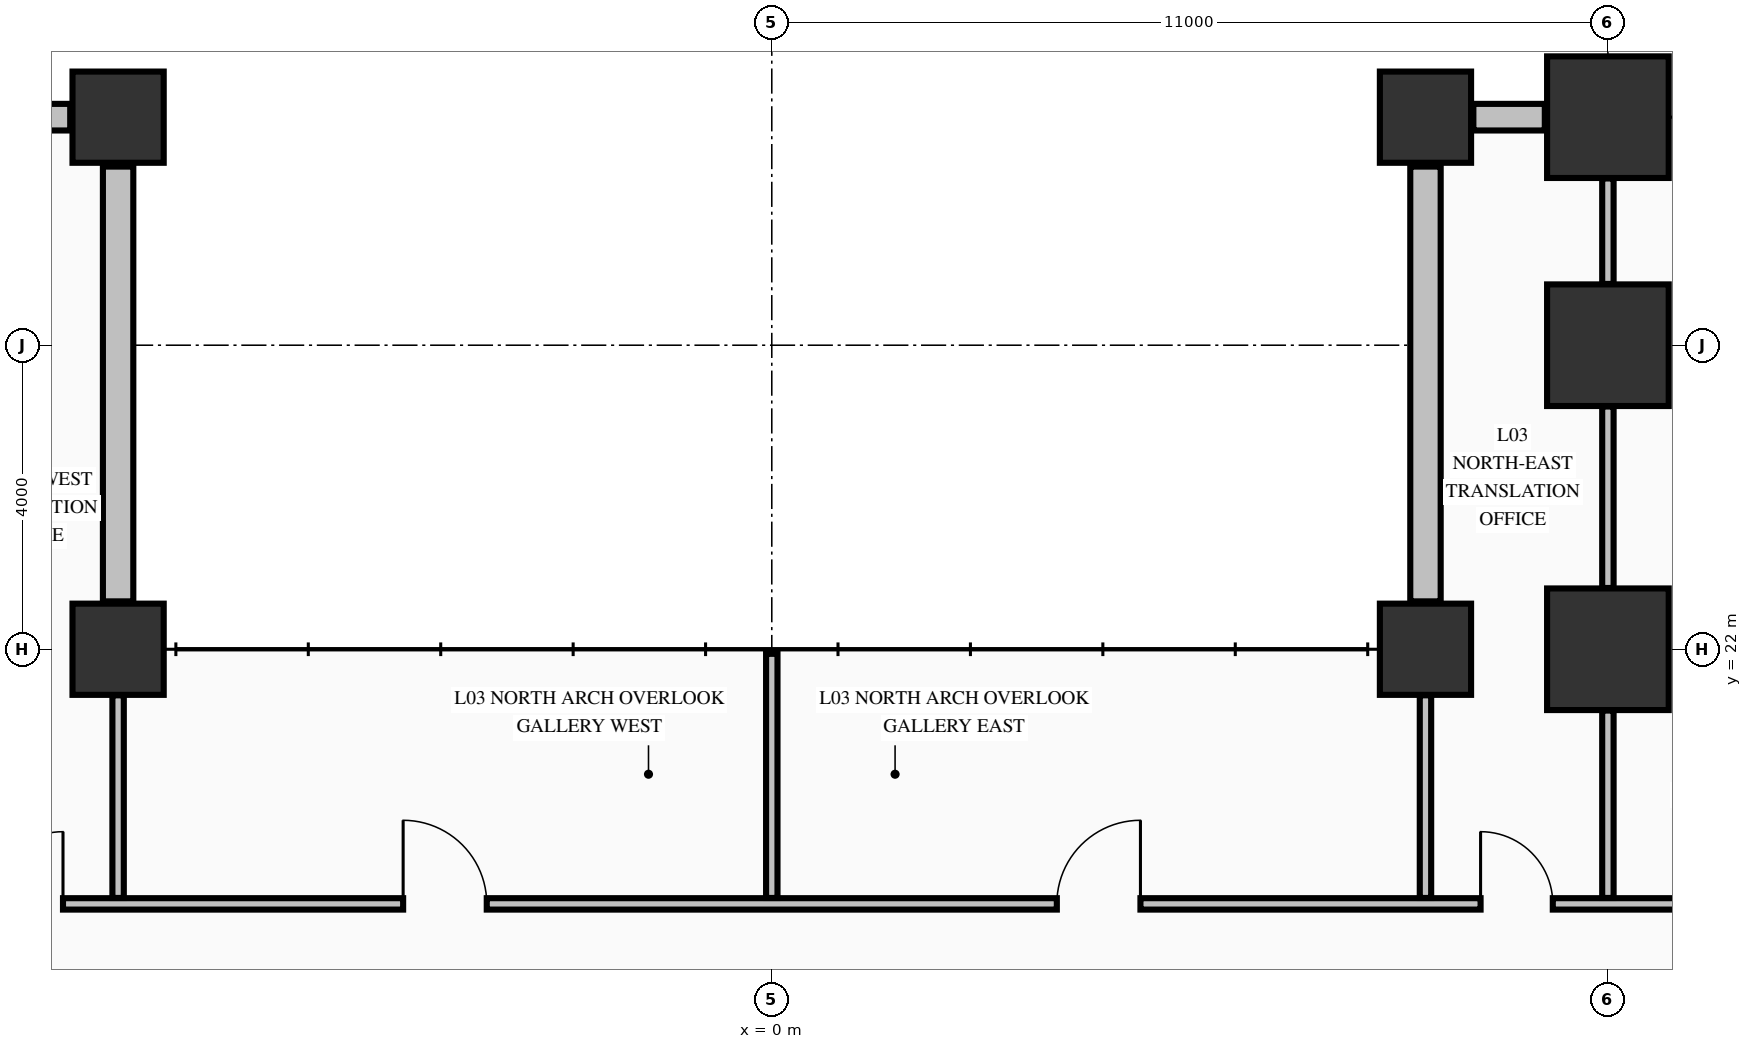
"""IFC4 building model, lengths in metres.
Left out: names, types, materials, properties, quantities, classifications, styles, units other than length and angle.
Written with IfcOpenShell. Run it as: python <this file> out.ifc"""

import sys

from ifc_helpers import new_model, si_unit, direction, frame, frame_2d, origin, origin_2d, place, context, subcontext, project, spatial, rectangle, extrude, element, fill, save


model = new_model("IFC4")
c1 = context("Model", 3, precision=1e-05, world=origin(), true_north=direction((0.0, 1.0)))
c2 = subcontext(c1, "Body", "Model", "MODEL_VIEW")
j1 = project(units=[si_unit("LENGTHUNIT", "METRE"), si_unit("PLANEANGLEUNIT", "RADIAN")], contexts=[c1])
p1 = place(None, origin())
s1 = spatial("IfcSite", under=j1, at=p1, CompositionType="ELEMENT")
p2 = place(p1, origin())
s2 = spatial("IfcBuilding", under=s1, at=p2, CompositionType="ELEMENT")
p3 = place(p2, frame((0.0, 0.0, 16.32)))
s3 = spatial("IfcBuildingStorey", under=s2, at=p3, CompositionType="ELEMENT", Elevation=16.32)
for number, where, z_axis, x_axis in (
    (1, (11.0, 22.0, 0.0), (0.0, 0.0, 1.0), (1.0, 0.0, 0.0)),
    (2, (11.0, 26.0, 0.0), (0.0, 0.0, 1.0), (1.0, 0.0, 0.0)),
    (3, (11.0, 29.0, 0.0), (0.0, 0.0, 1.0), (1.0, 0.0, 0.0)),
):
    element("IfcColumn", number, at=place(p3, frame(where, z_axis=z_axis, x_axis=x_axis)), inside=s3, PredefinedType="COLUMN", context=c2, shape_type="SweptSolid", body=[
        extrude(rectangle(XDim=1.6, YDim=1.6, at=origin_2d()), origin(), (0.0, 0.0, 1.0), 4.99),
    ])
for number, where, z_axis, x_axis in (
    (4, (-8.6, 22.0, 0.0), (0.0, 0.0, 1.0), (1.0, 0.0, 0.0)),
    (5, (8.6, 22.0, 0.0), (0.0, 0.0, 1.0), (1.0, 0.0, 0.0)),
    (6, (-8.6, 29.0, 0.0), (0.0, 0.0, 1.0), (1.0, 0.0, 0.0)),
    (7, (8.6, 29.0, 0.0), (0.0, 0.0, 1.0), (1.0, 0.0, 0.0)),
):
    element("IfcColumn", number, at=place(p3, frame(where, z_axis=z_axis, x_axis=x_axis)), inside=s3, PredefinedType="COLUMN", context=c2, shape_type="SweptSolid", body=[
        extrude(rectangle(XDim=1.2, YDim=1.2, at=origin_2d()), origin(), (0.0, 0.0, 1.0), 4.99),
    ])
for number, where, z_axis, x_axis in (
    (8, (-9.23, 29.0, 0.0), (0.0, 0.0, 1.0), (-1.0, 0.0, 0.0)),
    (9, (10.17, 29.0, 0.0), (0.0, 0.0, 1.0), (-1.0, 0.0, 0.0)),
):
    element("IfcWall", number, at=place(p3, frame(where, z_axis=z_axis, x_axis=x_axis)), inside=s3, PredefinedType="STANDARD", context=c2, shape_type="SweptSolid", body=[
        extrude(rectangle(XDim=0.94, YDim=0.35, at=frame_2d((0.47, 0.0))), origin(), (0.0, 0.0, 1.0), 3.332),
    ])
for number, where, z_axis, x_axis in (
    (10, (-8.6, 22.63, 0.0), (0.0, 0.0, 1.0), (0.0, 1.0, 0.0)),
    (11, (8.6, 28.35, 0.0), (0.0, 0.0, 1.0), (0.0, -1.0, 0.0)),
):
    element("IfcWall", number, at=place(p3, frame(where, z_axis=z_axis, x_axis=x_axis)), inside=s3, PredefinedType="STANDARD", context=c2, shape_type="SweptSolid", body=[
        extrude(rectangle(XDim=5.72, YDim=0.4, at=frame_2d((2.86, 0.0))), origin(), (0.0, 0.0, 1.0), 3.332),
    ])
p4 = place(p3, frame((-33.835, 18.65, 0.0), z_axis=(0.0, 0.0, 1.0), x_axis=(1.0, 0.0, 0.0)))
e12 = element("IfcWall", 12, at=p4, inside=s3, PredefinedType="PARTITIONING", context=c2, shape_type="SweptSolid", body=[
    extrude(rectangle(XDim=63.685, YDim=0.15, at=frame_2d((31.843, 0.0))), origin(), (0.0, 0.0, 1.0), 4.99),
])
p5 = place(p4, frame((1.285, 0.0, 0.0)))
e13 = element("IfcOpeningElement", 13, at=p5, cuts=e12, PredefinedType="OPENING", context=c2, shape_type="SweptSolid", body=[
    extrude(rectangle(XDim=1.1, YDim=2.15, at=frame_2d((0.55, 1.075))), frame((0.0, 0.085, 0.0), z_axis=(0.0, -1.0, 0.0), x_axis=(1.0, 0.0, 0.0)), (0.0, 0.0, 1.0), 0.17),
])
p6 = place(p4, frame((5.285, 0.0, 0.0)))
e14 = element("IfcOpeningElement", 14, at=p6, cuts=e12, PredefinedType="OPENING", context=c2, shape_type="SweptSolid", body=[
    extrude(rectangle(XDim=1.1, YDim=2.15, at=frame_2d((0.55, 1.075))), frame((0.0, 0.085, 0.0), z_axis=(0.0, -1.0, 0.0), x_axis=(1.0, 0.0, 0.0)), (0.0, 0.0, 1.0), 0.17),
])
p7 = place(p4, frame((8.785, 0.0, 0.0)))
e15 = element("IfcOpeningElement", 15, at=p7, cuts=e12, PredefinedType="OPENING", context=c2, shape_type="SweptSolid", body=[
    extrude(rectangle(XDim=1.1, YDim=2.15, at=frame_2d((0.55, 1.075))), frame((0.0, 0.085, 0.0), z_axis=(0.0, -1.0, 0.0), x_axis=(1.0, 0.0, 0.0)), (0.0, 0.0, 1.0), 0.17),
])
p8 = place(p4, frame((11.785, 0.0, 0.0)))
e16 = element("IfcOpeningElement", 16, at=p8, cuts=e12, PredefinedType="OPENING", context=c2, shape_type="SweptSolid", body=[
    extrude(rectangle(XDim=1.1, YDim=2.15, at=frame_2d((0.55, 1.075))), frame((0.0, 0.085, 0.0), z_axis=(0.0, -1.0, 0.0), x_axis=(1.0, 0.0, 0.0)), (0.0, 0.0, 1.0), 0.17),
])
p9 = place(p4, frame((15.535, 0.0, 0.0)))
e17 = element("IfcOpeningElement", 17, at=p9, cuts=e12, PredefinedType="OPENING", context=c2, shape_type="SweptSolid", body=[
    extrude(rectangle(XDim=1.1, YDim=2.15, at=frame_2d((0.55, 1.075))), frame((0.0, 0.085, 0.0), z_axis=(0.0, -1.0, 0.0), x_axis=(1.0, 0.0, 0.0)), (0.0, 0.0, 1.0), 0.17),
])
p10 = place(p4, frame((20.035, 0.0, 0.0)))
e18 = element("IfcOpeningElement", 18, at=p10, cuts=e12, PredefinedType="OPENING", context=c2, shape_type="SweptSolid", body=[
    extrude(rectangle(XDim=1.1, YDim=2.15, at=frame_2d((0.55, 1.075))), frame((0.0, 0.085, 0.0), z_axis=(0.0, -1.0, 0.0), x_axis=(1.0, 0.0, 0.0)), (0.0, 0.0, 1.0), 0.17),
])
p11 = place(p4, frame((23.56, 0.0, 0.0)))
e19 = element("IfcOpeningElement", 19, at=p11, cuts=e12, PredefinedType="OPENING", context=c2, shape_type="SweptSolid", body=[
    extrude(rectangle(XDim=0.95, YDim=2.15, at=frame_2d((0.475, 1.075))), frame((0.0, 0.085, 0.0), z_axis=(0.0, -1.0, 0.0), x_axis=(1.0, 0.0, 0.0)), (0.0, 0.0, 1.0), 0.17),
])
p12 = place(p4, frame((28.985, 0.0, 0.0)))
e20 = element("IfcOpeningElement", 20, at=p12, cuts=e12, PredefinedType="OPENING", context=c2, shape_type="SweptSolid", body=[
    extrude(rectangle(XDim=1.1, YDim=2.15, at=frame_2d((0.55, 1.075))), frame((0.0, 0.085, 0.0), z_axis=(0.0, -1.0, 0.0), x_axis=(1.0, 0.0, 0.0)), (0.0, 0.0, 1.0), 0.17),
])
p13 = place(p4, frame((37.585, 0.0, 0.0)))
e21 = element("IfcOpeningElement", 21, at=p13, cuts=e12, PredefinedType="OPENING", context=c2, shape_type="SweptSolid", body=[
    extrude(rectangle(XDim=1.1, YDim=2.15, at=frame_2d((0.55, 1.075))), frame((0.0, 0.085, 0.0), z_axis=(0.0, -1.0, 0.0), x_axis=(1.0, 0.0, 0.0)), (0.0, 0.0, 1.0), 0.17),
])
p14 = place(p4, frame((43.16, 0.0, 0.0)))
e22 = element("IfcOpeningElement", 22, at=p14, cuts=e12, PredefinedType="OPENING", context=c2, shape_type="SweptSolid", body=[
    extrude(rectangle(XDim=0.95, YDim=2.15, at=frame_2d((0.475, 1.075))), frame((0.0, 0.085, 0.0), z_axis=(0.0, -1.0, 0.0), x_axis=(1.0, 0.0, 0.0)), (0.0, 0.0, 1.0), 0.17),
])
p15 = place(p4, frame((61.31, 0.0, 0.0)))
e23 = element("IfcOpeningElement", 23, at=p15, cuts=e12, PredefinedType="OPENING", context=c2, shape_type="SweptSolid", body=[
    extrude(rectangle(XDim=0.95, YDim=2.15, at=frame_2d((0.475, 1.075))), frame((0.0, 0.085, 0.0), z_axis=(0.0, -1.0, 0.0), x_axis=(1.0, 0.0, 0.0)), (0.0, 0.0, 1.0), 0.17),
])
p16 = place(p4, frame((47.56, 0.0, 0.0)))
e24 = element("IfcOpeningElement", 24, at=p16, cuts=e12, PredefinedType="OPENING", context=c2, shape_type="SweptSolid", body=[
    extrude(rectangle(XDim=0.95, YDim=2.15, at=frame_2d((0.475, 1.075))), frame((0.0, 0.085, 0.0), z_axis=(0.0, -1.0, 0.0), x_axis=(1.0, 0.0, 0.0)), (0.0, 0.0, 1.0), 0.17),
])
p17 = place(p4, frame((51.31, 0.0, 0.0)))
e25 = element("IfcOpeningElement", 25, at=p17, cuts=e12, PredefinedType="OPENING", context=c2, shape_type="SweptSolid", body=[
    extrude(rectangle(XDim=1.05, YDim=2.15, at=frame_2d((0.525, 1.075))), frame((0.0, 0.085, 0.0), z_axis=(0.0, -1.0, 0.0), x_axis=(1.0, 0.0, 0.0)), (0.0, 0.0, 1.0), 0.17),
])
p18 = place(p4, frame((56.06, 0.0, 0.0)))
e26 = element("IfcOpeningElement", 26, at=p18, cuts=e12, PredefinedType="OPENING", context=c2, shape_type="SweptSolid", body=[
    extrude(rectangle(XDim=0.95, YDim=2.15, at=frame_2d((0.475, 1.075))), frame((0.0, 0.085, 0.0), z_axis=(0.0, -1.0, 0.0), x_axis=(1.0, 0.0, 0.0)), (0.0, 0.0, 1.0), 0.17),
])
p19 = place(p4, frame((58.535, 0.0, 0.0)))
e27 = element("IfcOpeningElement", 27, at=p19, cuts=e12, PredefinedType="OPENING", context=c2, shape_type="SweptSolid", body=[
    extrude(rectangle(XDim=0.9, YDim=2.15, at=frame_2d((0.45, 1.075))), frame((0.0, 0.085, 0.0), z_axis=(0.0, -1.0, 0.0), x_axis=(1.0, 0.0, 0.0)), (0.0, 0.0, 1.0), 0.17),
])
p20 = place(p3, frame((-8.6, 18.728, 0.0), z_axis=(0.0, 0.0, 1.0), x_axis=(0.0, 1.0, 0.0)))
e28 = element("IfcWall", 28, at=p20, inside=s3, PredefinedType="PARTITIONING", context=c2, shape_type="SweptSolid", body=[
    extrude(rectangle(XDim=2.666, YDim=0.15, at=frame_2d((1.333, 0.0))), origin(), (0.0, 0.0, 1.0), 3.332),
])
p21 = place(p3, frame((0.0, 18.728, 0.0), z_axis=(0.0, 0.0, 1.0), x_axis=(0.0, 1.0, 0.0)))
e29 = element("IfcWall", 29, at=p21, inside=s3, PredefinedType="PARTITIONING", context=c2, shape_type="SweptSolid", body=[
    extrude(rectangle(XDim=3.212, YDim=0.15, at=frame_2d((1.606, 0.0))), origin(), (0.0, 0.0, 1.0), 3.332),
])
p22 = place(p3, frame((8.6, 18.728, 0.0), z_axis=(0.0, 0.0, 1.0), x_axis=(0.0, 1.0, 0.0)))
e30 = element("IfcWall", 30, at=p22, inside=s3, PredefinedType="PARTITIONING", context=c2, shape_type="SweptSolid", body=[
    extrude(rectangle(XDim=2.666, YDim=0.15, at=frame_2d((1.333, 0.0))), origin(), (0.0, 0.0, 1.0), 3.332),
])
p23 = place(p3, frame((11.0, 18.728, 0.0), z_axis=(0.0, 0.0, 1.0), x_axis=(0.0, 1.0, 0.0)))
e31 = element("IfcWall", 31, at=p23, inside=s3, PredefinedType="PARTITIONING", context=c2, shape_type="SweptSolid", body=[
    extrude(rectangle(XDim=2.466, YDim=0.15, at=frame_2d((1.233, 0.0))), origin(), (0.0, 0.0, 1.0), 3.332),
])
p24 = place(p3, frame((11.0, 22.806, 0.0), z_axis=(0.0, 0.0, 1.0), x_axis=(0.0, 1.0, 0.0)))
e32 = element("IfcWall", 32, at=p24, inside=s3, PredefinedType="PARTITIONING", context=c2, shape_type="SweptSolid", body=[
    extrude(rectangle(XDim=2.388, YDim=0.15, at=frame_2d((1.194, 0.0))), origin(), (0.0, 0.0, 1.0), 3.332),
])
p25 = place(p3, frame((11.0, 26.806, 0.0), z_axis=(0.0, 0.0, 1.0), x_axis=(0.0, 1.0, 0.0)))
e33 = element("IfcWall", 33, at=p25, inside=s3, PredefinedType="PARTITIONING", context=c2, shape_type="SweptSolid", body=[
    extrude(rectangle(XDim=1.388, YDim=0.15, at=frame_2d((0.694, 0.0))), origin(), (0.0, 0.0, 1.0), 3.332),
])
p26 = place(p11, origin())
e34 = element("IfcDoor", 34, at=p26, inside=s3, OperationType="SINGLE_SWING_RIGHT", PredefinedType="DOOR", context=c2, shape_type="SweptSolid", body=[
    extrude(rectangle(XDim=0.95, YDim=2.15, at=frame_2d((0.475, 1.075))), frame((0.0, 0.025, 0.0), z_axis=(0.0, -1.0, 0.0), x_axis=(1.0, 0.0, 0.0)), (0.0, 0.0, 1.0), 0.05),
])
fill(e19, e34)
p27 = place(p12, origin())
e35 = element("IfcDoor", 35, at=p27, inside=s3, OperationType="SINGLE_SWING_LEFT", PredefinedType="DOOR", context=c2, shape_type="SweptSolid", body=[
    extrude(rectangle(XDim=1.1, YDim=2.15, at=frame_2d((0.55, 1.075))), frame((0.0, 0.025, 0.0), z_axis=(0.0, -1.0, 0.0), x_axis=(1.0, 0.0, 0.0)), (0.0, 0.0, 1.0), 0.05),
])
fill(e20, e35)
p28 = place(p13, origin())
e36 = element("IfcDoor", 36, at=p28, inside=s3, OperationType="SINGLE_SWING_RIGHT", PredefinedType="DOOR", context=c2, shape_type="SweptSolid", body=[
    extrude(rectangle(XDim=1.1, YDim=2.15, at=frame_2d((0.55, 1.075))), frame((0.0, 0.025, 0.0), z_axis=(0.0, -1.0, 0.0), x_axis=(1.0, 0.0, 0.0)), (0.0, 0.0, 1.0), 0.05),
])
fill(e21, e36)
p29 = place(p14, origin())
e37 = element("IfcDoor", 37, at=p29, inside=s3, OperationType="SINGLE_SWING_LEFT", PredefinedType="DOOR", context=c2, shape_type="SweptSolid", body=[
    extrude(rectangle(XDim=0.95, YDim=2.15, at=frame_2d((0.475, 1.075))), frame((0.0, 0.025, 0.0), z_axis=(0.0, -1.0, 0.0), x_axis=(1.0, 0.0, 0.0)), (0.0, 0.0, 1.0), 0.05),
])
fill(e22, e37)
save(model, sys.argv[1])
